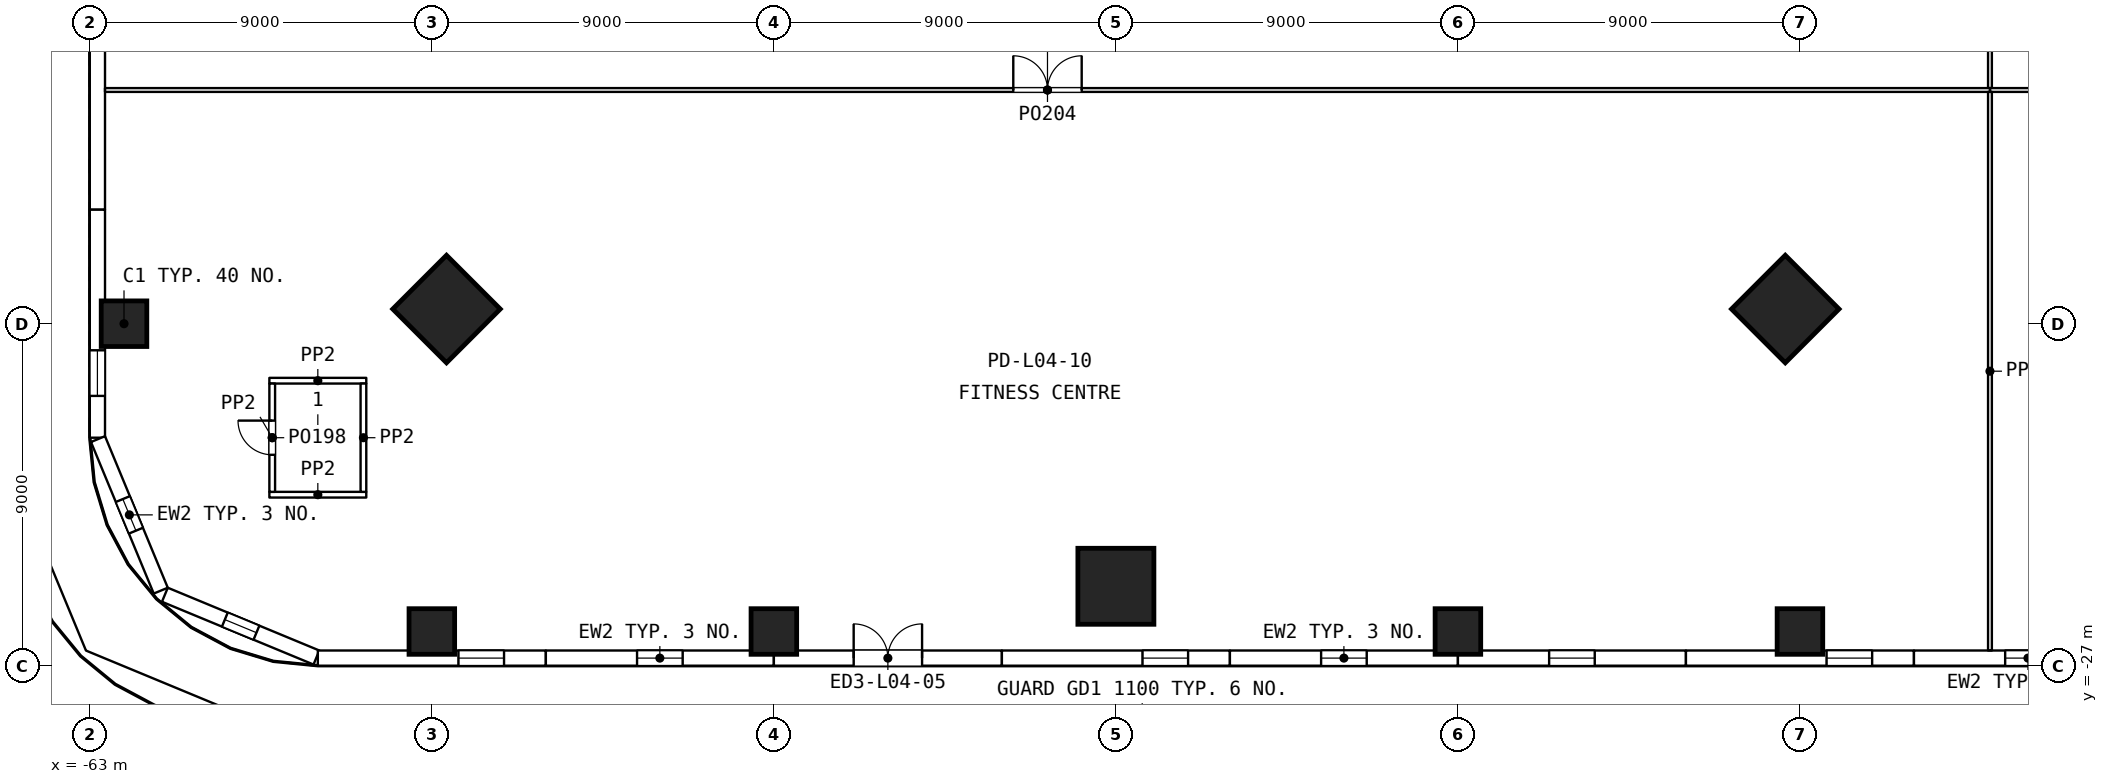
"""IFC4 building model, lengths in metres.
Left out: names, types, materials, properties, quantities, classifications, styles, units other than length and angle.
Written with IfcOpenShell. Run it as: python <this file> out.ifc"""

import sys

from ifc_helpers import new_model, si_unit, direction, frame, frame_2d, origin, origin_2d, place, context, subcontext, project, spatial, rectangle, extrude, element, fill, save


model = new_model("IFC4")
c1 = context("Model", 3, precision=1e-05, world=origin(), true_north=direction((0.0, 1.0)))
c2 = subcontext(c1, "Body", "Model", "MODEL_VIEW")
j1 = project(units=[si_unit("LENGTHUNIT", "METRE"), si_unit("PLANEANGLEUNIT", "RADIAN")], contexts=[c1])
p1 = place(None, origin())
s1 = spatial("IfcSite", under=j1, at=p1, CompositionType="ELEMENT")
p2 = place(p1, origin())
s2 = spatial("IfcBuilding", under=s1, at=p2, CompositionType="ELEMENT")
p3 = place(p2, frame((0.0, 0.0, 22.8)))
s3 = spatial("IfcBuildingStorey", under=s2, at=p3, CompositionType="ELEMENT", Elevation=22.8)
for number, where, z_axis, x_axis in (
    (1, (-62.1, -18.0, 0.0), (0.0, 0.0, 1.0), (1.0, 0.0, 0.0)),
    (2, (-54.0, -26.1, 0.0), (0.0, 0.0, 1.0), (1.0, 0.0, 0.0)),
    (3, (-45.0, -26.1, 0.0), (0.0, 0.0, 1.0), (1.0, 0.0, 0.0)),
    (4, (-27.0, -26.1, 0.0), (0.0, 0.0, 1.0), (1.0, 0.0, 0.0)),
    (5, (-18.0, -26.1, 0.0), (0.0, 0.0, 1.0), (1.0, 0.0, 0.0)),
):
    element("IfcColumn", number, at=place(p3, frame(where, z_axis=z_axis, x_axis=x_axis)), inside=s3, PredefinedType="COLUMN", context=c2, shape_type="SweptSolid", body=[
        extrude(rectangle(XDim=1.2, YDim=1.2, at=origin_2d()), origin(), (0.0, 0.0, 1.0), 4.8),
    ])
for number, where, z_axis, x_axis in (
    (6, (-53.614, -17.614, 0.0), (0.0, 0.0, 1.0), (-0.707, -0.707, 0.0)),
    (7, (-36.0, -24.91, 0.0), (0.0, 0.0, 1.0), (0.0, -1.0, 0.0)),
    (8, (-18.386, -17.614, 0.0), (0.0, 0.0, 1.0), (0.707, -0.707, 0.0)),
):
    element("IfcColumn", number, at=place(p3, frame(where, z_axis=z_axis, x_axis=x_axis)), inside=s3, PredefinedType="COLUMN", context=c2, shape_type="SweptSolid", body=[
        extrude(rectangle(XDim=2.0, YDim=2.0, at=origin_2d()), origin(), (0.0, 0.0, 1.0), 4.8),
    ])
p4 = place(p3, frame((-62.8, -9.0, 0.0), z_axis=(0.0, 0.0, 1.0), x_axis=(0.0, -1.0, 0.0)))
e9 = element("IfcWall", 9, at=p4, inside=s3, PredefinedType="SOLIDWALL", context=c2, shape_type="SweptSolid", body=[
    extrude(rectangle(XDim=6.0, YDim=0.4, at=frame_2d((3.0, 0.0))), origin(), (0.0, 0.0, 1.0), 4.5),
])
p5 = place(p3, frame((-62.8, -15.0, 0.0), z_axis=(0.0, 0.0, 1.0), x_axis=(0.0, -1.0, 0.0)))
e10 = element("IfcWall", 10, at=p5, inside=s3, PredefinedType="SOLIDWALL", context=c2, shape_type="SweptSolid", body=[
    extrude(rectangle(XDim=6.0, YDim=0.4, at=frame_2d((3.0, 0.0))), origin(), (0.0, 0.0, 1.0), 4.5),
])
p6 = place(p5, frame((3.7, 0.0, 1.1)))
e11 = element("IfcOpeningElement", 11, at=p6, cuts=e10, PredefinedType="OPENING", context=c2, shape_type="SweptSolid", body=[
    extrude(rectangle(XDim=1.2, YDim=1.8, at=frame_2d((0.6, 0.9))), frame((0.0, 0.21, 0.0), z_axis=(0.0, -1.0, 0.0), x_axis=(1.0, 0.0, 0.0)), (0.0, 0.0, 1.0), 0.42),
])
p7 = place(p3, frame((-62.785, -21.037, 0.0), z_axis=(0.0, 0.0, 1.0), x_axis=(0.382743086333, -0.923854820772, 0.0)))
e12 = element("IfcWall", 12, at=p7, inside=s3, PredefinedType="SOLIDWALL", context=c2, shape_type="SweptSolid", body=[
    extrude(rectangle(XDim=4.316, YDim=0.4, at=frame_2d((2.158, 0.0))), origin(), (0.0, 0.0, 1.0), 4.5),
])
p8 = place(p7, frame((1.708, 0.0, 1.0)))
e13 = element("IfcOpeningElement", 13, at=p8, cuts=e12, PredefinedType="OPENING", context=c2, shape_type="SweptSolid", body=[
    extrude(rectangle(XDim=0.9, YDim=2.4, at=frame_2d((0.45, 1.2))), frame((0.0, 0.21, 0.0), z_axis=(0.0, -1.0, 0.0), x_axis=(1.0, 0.0, 0.0)), (0.0, 0.0, 1.0), 0.42),
])
p9 = place(p3, frame((-61.025, -25.133, 0.0), z_axis=(0.0, 0.0, 1.0), x_axis=(0.923854820772, -0.382743086333, 0.0)))
e14 = element("IfcWall", 14, at=p9, inside=s3, PredefinedType="SOLIDWALL", context=c2, shape_type="SweptSolid", body=[
    extrude(rectangle(XDim=4.316, YDim=0.4, at=frame_2d((2.158, 0.0))), origin(), (0.0, 0.0, 1.0), 4.5),
])
p10 = place(p9, frame((1.708, 0.0, 1.0)))
e15 = element("IfcOpeningElement", 15, at=p10, cuts=e14, PredefinedType="OPENING", context=c2, shape_type="SweptSolid", body=[
    extrude(rectangle(XDim=0.9, YDim=2.4, at=frame_2d((0.45, 1.2))), frame((0.0, 0.21, 0.0), z_axis=(0.0, -1.0, 0.0), x_axis=(1.0, 0.0, 0.0)), (0.0, 0.0, 1.0), 0.42),
])
p11 = place(p3, frame((-57.0, -26.8, 0.0), z_axis=(0.0, 0.0, 1.0), x_axis=(1.0, 0.0, 0.0)))
e16 = element("IfcWall", 16, at=p11, inside=s3, PredefinedType="SOLIDWALL", context=c2, shape_type="SweptSolid", body=[
    extrude(rectangle(XDim=6.0, YDim=0.4, at=frame_2d((3.0, 0.0))), origin(), (0.0, 0.0, 1.0), 4.5),
])
p12 = place(p11, frame((3.7, 0.0, 1.1)))
e17 = element("IfcOpeningElement", 17, at=p12, cuts=e16, PredefinedType="OPENING", context=c2, shape_type="SweptSolid", body=[
    extrude(rectangle(XDim=1.2, YDim=1.8, at=frame_2d((0.6, 0.9))), frame((0.0, 0.21, 0.0), z_axis=(0.0, -1.0, 0.0), x_axis=(1.0, 0.0, 0.0)), (0.0, 0.0, 1.0), 0.42),
])
p13 = place(p3, frame((-51.0, -26.8, 0.0), z_axis=(0.0, 0.0, 1.0), x_axis=(1.0, 0.0, 0.0)))
e18 = element("IfcWall", 18, at=p13, inside=s3, PredefinedType="SOLIDWALL", context=c2, shape_type="SweptSolid", body=[
    extrude(rectangle(XDim=6.0, YDim=0.4, at=frame_2d((3.0, 0.0))), origin(), (0.0, 0.0, 1.0), 4.5),
])
p14 = place(p13, frame((2.4, 0.0, 1.1)))
e19 = element("IfcOpeningElement", 19, at=p14, cuts=e18, PredefinedType="OPENING", context=c2, shape_type="SweptSolid", body=[
    extrude(rectangle(XDim=1.2, YDim=1.8, at=frame_2d((0.6, 0.9))), frame((0.0, 0.21, 0.0), z_axis=(0.0, -1.0, 0.0), x_axis=(1.0, 0.0, 0.0)), (0.0, 0.0, 1.0), 0.42),
])
p15 = place(p3, frame((-45.0, -26.8, 0.0), z_axis=(0.0, 0.0, 1.0), x_axis=(1.0, 0.0, 0.0)))
e20 = element("IfcWall", 20, at=p15, inside=s3, PredefinedType="SOLIDWALL", context=c2, shape_type="SweptSolid", body=[
    extrude(rectangle(XDim=6.0, YDim=0.4, at=frame_2d((3.0, 0.0))), origin(), (0.0, 0.0, 1.0), 4.5),
])
p16 = place(p15, frame((2.1, 0.0, 0.0)))
e21 = element("IfcOpeningElement", 21, at=p16, cuts=e20, PredefinedType="OPENING", context=c2, shape_type="SweptSolid", body=[
    extrude(rectangle(XDim=1.8, YDim=2.4, at=frame_2d((0.9, 1.2))), frame((0.0, 0.21, 0.0), z_axis=(0.0, -1.0, 0.0), x_axis=(1.0, 0.0, 0.0)), (0.0, 0.0, 1.0), 0.42),
])
p17 = place(p3, frame((-39.0, -26.8, 0.0), z_axis=(0.0, 0.0, 1.0), x_axis=(1.0, 0.0, 0.0)))
e22 = element("IfcWall", 22, at=p17, inside=s3, PredefinedType="SOLIDWALL", context=c2, shape_type="SweptSolid", body=[
    extrude(rectangle(XDim=6.0, YDim=0.4, at=frame_2d((3.0, 0.0))), origin(), (0.0, 0.0, 1.0), 4.5),
])
p18 = place(p17, frame((3.7, 0.0, 1.1)))
e23 = element("IfcOpeningElement", 23, at=p18, cuts=e22, PredefinedType="OPENING", context=c2, shape_type="SweptSolid", body=[
    extrude(rectangle(XDim=1.2, YDim=1.8, at=frame_2d((0.6, 0.9))), frame((0.0, 0.21, 0.0), z_axis=(0.0, -1.0, 0.0), x_axis=(1.0, 0.0, 0.0)), (0.0, 0.0, 1.0), 0.42),
])
p19 = place(p3, frame((-33.0, -26.8, 0.0), z_axis=(0.0, 0.0, 1.0), x_axis=(1.0, 0.0, 0.0)))
e24 = element("IfcWall", 24, at=p19, inside=s3, PredefinedType="SOLIDWALL", context=c2, shape_type="SweptSolid", body=[
    extrude(rectangle(XDim=6.0, YDim=0.4, at=frame_2d((3.0, 0.0))), origin(), (0.0, 0.0, 1.0), 4.5),
])
p20 = place(p19, frame((2.4, 0.0, 1.1)))
e25 = element("IfcOpeningElement", 25, at=p20, cuts=e24, PredefinedType="OPENING", context=c2, shape_type="SweptSolid", body=[
    extrude(rectangle(XDim=1.2, YDim=1.8, at=frame_2d((0.6, 0.9))), frame((0.0, 0.21, 0.0), z_axis=(0.0, -1.0, 0.0), x_axis=(1.0, 0.0, 0.0)), (0.0, 0.0, 1.0), 0.42),
])
p21 = place(p3, frame((-27.0, -26.8, 0.0), z_axis=(0.0, 0.0, 1.0), x_axis=(1.0, 0.0, 0.0)))
e26 = element("IfcWall", 26, at=p21, inside=s3, PredefinedType="SOLIDWALL", context=c2, shape_type="SweptSolid", body=[
    extrude(rectangle(XDim=6.0, YDim=0.4, at=frame_2d((3.0, 0.0))), origin(), (0.0, 0.0, 1.0), 4.5),
])
p22 = place(p21, frame((2.4, 0.0, 1.1)))
e27 = element("IfcOpeningElement", 27, at=p22, cuts=e26, PredefinedType="OPENING", context=c2, shape_type="SweptSolid", body=[
    extrude(rectangle(XDim=1.2, YDim=1.8, at=frame_2d((0.6, 0.9))), frame((0.0, 0.21, 0.0), z_axis=(0.0, -1.0, 0.0), x_axis=(1.0, 0.0, 0.0)), (0.0, 0.0, 1.0), 0.42),
])
p23 = place(p3, frame((-21.0, -26.8, 0.0), z_axis=(0.0, 0.0, 1.0), x_axis=(1.0, 0.0, 0.0)))
e28 = element("IfcWall", 28, at=p23, inside=s3, PredefinedType="SOLIDWALL", context=c2, shape_type="SweptSolid", body=[
    extrude(rectangle(XDim=6.0, YDim=0.4, at=frame_2d((3.0, 0.0))), origin(), (0.0, 0.0, 1.0), 4.5),
])
p24 = place(p23, frame((3.7, 0.0, 1.1)))
e29 = element("IfcOpeningElement", 29, at=p24, cuts=e28, PredefinedType="OPENING", context=c2, shape_type="SweptSolid", body=[
    extrude(rectangle(XDim=1.2, YDim=1.8, at=frame_2d((0.6, 0.9))), frame((0.0, 0.21, 0.0), z_axis=(0.0, -1.0, 0.0), x_axis=(1.0, 0.0, 0.0)), (0.0, 0.0, 1.0), 0.42),
])
p25 = place(p3, frame((-15.0, -26.8, 0.0), z_axis=(0.0, 0.0, 1.0), x_axis=(1.0, 0.0, 0.0)))
e30 = element("IfcWall", 30, at=p25, inside=s3, PredefinedType="SOLIDWALL", context=c2, shape_type="SweptSolid", body=[
    extrude(rectangle(XDim=6.0, YDim=0.4, at=frame_2d((3.0, 0.0))), origin(), (0.0, 0.0, 1.0), 4.5),
])
p26 = place(p25, frame((2.4, 0.0, 1.1)))
e31 = element("IfcOpeningElement", 31, at=p26, cuts=e30, PredefinedType="OPENING", context=c2, shape_type="SweptSolid", body=[
    extrude(rectangle(XDim=1.2, YDim=1.8, at=frame_2d((0.6, 0.9))), frame((0.0, 0.21, 0.0), z_axis=(0.0, -1.0, 0.0), x_axis=(1.0, 0.0, 0.0)), (0.0, 0.0, 1.0), 0.42),
])
for number, where, z_axis, x_axis in (
    (32, (-58.275, -22.5, 0.0), (0.0, 0.0, 1.0), (1.0, 0.0, 0.0)),
    (33, (-58.275, -19.5, 0.0), (0.0, 0.0, 1.0), (1.0, 0.0, 0.0)),
):
    element("IfcWall", number, at=place(p3, frame(where, z_axis=z_axis, x_axis=x_axis)), inside=s3, PredefinedType="PARTITIONING", context=c2, shape_type="SweptSolid", body=[
        extrude(rectangle(XDim=2.55, YDim=0.15, at=frame_2d((1.275, 0.0))), origin(), (0.0, 0.0, 1.0), 4.5),
    ])
p27 = place(p3, frame((-58.2, -22.425, 0.0), z_axis=(0.0, 0.0, 1.0), x_axis=(0.0, 1.0, 0.0)))
e34 = element("IfcWall", 34, at=p27, inside=s3, PredefinedType="PARTITIONING", context=c2, shape_type="SweptSolid", body=[
    extrude(rectangle(XDim=2.85, YDim=0.15, at=frame_2d((1.425, 0.0))), origin(), (0.0, 0.0, 1.0), 4.5),
])
p28 = place(p27, frame((0.975, 0.0, 0.0)))
e35 = element("IfcOpeningElement", 35, at=p28, cuts=e34, PredefinedType="OPENING", context=c2, shape_type="SweptSolid", body=[
    extrude(rectangle(XDim=0.9, YDim=2.1, at=frame_2d((0.45, 1.05))), frame((0.0, 0.085, 0.0), z_axis=(0.0, -1.0, 0.0), x_axis=(1.0, 0.0, 0.0)), (0.0, 0.0, 1.0), 0.17),
])
p29 = place(p3, frame((-55.8, -22.425, 0.0), z_axis=(0.0, 0.0, 1.0), x_axis=(0.0, 1.0, 0.0)))
e36 = element("IfcWall", 36, at=p29, inside=s3, PredefinedType="PARTITIONING", context=c2, shape_type="SweptSolid", body=[
    extrude(rectangle(XDim=2.85, YDim=0.15, at=frame_2d((1.425, 0.0))), origin(), (0.0, 0.0, 1.0), 4.5),
])
p30 = place(p3, frame((-13.0, -11.8, 0.0), z_axis=(0.0, 0.0, 1.0), x_axis=(0.0, 1.0, 0.0)))
e37 = element("IfcWall", 37, at=p30, inside=s3, PredefinedType="PARTITIONING", context=c2, shape_type="SweptSolid", body=[
    extrude(rectangle(XDim=23.6, YDim=0.1, at=frame_2d((11.8, 0.0))), origin(), (0.0, 0.0, 1.0), 4.5),
])
p31 = place(p30, frame((13.55, 0.0, 0.0)))
e38 = element("IfcOpeningElement", 38, at=p31, cuts=e37, PredefinedType="OPENING", context=c2, shape_type="SweptSolid", body=[
    extrude(rectangle(XDim=1.8, YDim=2.1, at=frame_2d((0.9, 1.05))), frame((0.0, 0.06, 0.0), z_axis=(0.0, -1.0, 0.0), x_axis=(1.0, 0.0, 0.0)), (0.0, 0.0, 1.0), 0.12),
])
p32 = place(p3, frame((-13.0, -11.85, 0.0), z_axis=(0.0, 0.0, 1.0), x_axis=(1.0, 0.0, 0.0)))
e39 = element("IfcWall", 39, at=p32, inside=s3, PredefinedType="PARTITIONING", context=c2, shape_type="SweptSolid", body=[
    extrude(rectangle(XDim=26.0, YDim=0.1, at=frame_2d((13.0, 0.0))), origin(), (0.0, 0.0, 1.0), 4.5),
])
p33 = place(p32, frame((12.1, 0.0, 0.0)))
e40 = element("IfcOpeningElement", 40, at=p33, cuts=e39, PredefinedType="OPENING", context=c2, shape_type="SweptSolid", body=[
    extrude(rectangle(XDim=1.8, YDim=2.1, at=frame_2d((0.9, 1.05))), frame((0.0, 0.06, 0.0), z_axis=(0.0, -1.0, 0.0), x_axis=(1.0, 0.0, 0.0)), (0.0, 0.0, 1.0), 0.12),
])
p34 = place(p3, frame((-62.6, -11.85, 0.0), z_axis=(0.0, 0.0, 1.0), x_axis=(1.0, 0.0, 0.0)))
e41 = element("IfcWall", 41, at=p34, inside=s3, PredefinedType="PARTITIONING", context=c2, shape_type="SweptSolid", body=[
    extrude(rectangle(XDim=49.6, YDim=0.1, at=frame_2d((24.8, 0.0))), origin(), (0.0, 0.0, 1.0), 4.5),
])
p35 = place(p34, frame((23.9, 0.0, 0.0)))
e42 = element("IfcOpeningElement", 42, at=p35, cuts=e41, PredefinedType="OPENING", context=c2, shape_type="SweptSolid", body=[
    extrude(rectangle(XDim=1.8, YDim=2.1, at=frame_2d((0.9, 1.05))), frame((0.0, 0.06, 0.0), z_axis=(0.0, -1.0, 0.0), x_axis=(1.0, 0.0, 0.0)), (0.0, 0.0, 1.0), 0.12),
])
p36 = place(p3, frame((-13.0, -26.6, 0.0), z_axis=(0.0, 0.0, 1.0), x_axis=(0.0, 1.0, 0.0)))
e43 = element("IfcWall", 43, at=p36, inside=s3, PredefinedType="PARTITIONING", context=c2, shape_type="SweptSolid", body=[
    extrude(rectangle(XDim=14.7, YDim=0.1, at=frame_2d((7.35, 0.0))), origin(), (0.0, 0.0, 1.0), 4.5),
])
p37 = place(p6, origin())
e44 = element("IfcWindow", 44, at=p37, inside=s3, PartitioningType="SINGLE_PANEL", PredefinedType="WINDOW", context=c2, shape_type="SweptSolid", body=[
    extrude(rectangle(XDim=1.2, YDim=1.8, at=frame_2d((0.6, 0.9))), frame((0.0, 0.03, 0.0), z_axis=(0.0, -1.0, 0.0), x_axis=(1.0, 0.0, 0.0)), (0.0, 0.0, 1.0), 0.06),
])
fill(e11, e44)
p38 = place(p8, origin())
e45 = element("IfcWindow", 45, at=p38, inside=s3, PartitioningType="SINGLE_PANEL", PredefinedType="WINDOW", context=c2, shape_type="SweptSolid", body=[
    extrude(rectangle(XDim=0.9, YDim=2.4, at=frame_2d((0.45, 1.2))), frame((0.0, 0.03, 0.0), z_axis=(0.0, -1.0, 0.0), x_axis=(1.0, 0.0, 0.0)), (0.0, 0.0, 1.0), 0.06),
])
fill(e13, e45)
p39 = place(p10, origin())
e46 = element("IfcWindow", 46, at=p39, inside=s3, PartitioningType="SINGLE_PANEL", PredefinedType="WINDOW", context=c2, shape_type="SweptSolid", body=[
    extrude(rectangle(XDim=0.9, YDim=2.4, at=frame_2d((0.45, 1.2))), frame((0.0, 0.03, 0.0), z_axis=(0.0, -1.0, 0.0), x_axis=(1.0, 0.0, 0.0)), (0.0, 0.0, 1.0), 0.06),
])
fill(e15, e46)
p40 = place(p12, origin())
e47 = element("IfcWindow", 47, at=p40, inside=s3, PartitioningType="SINGLE_PANEL", PredefinedType="WINDOW", context=c2, shape_type="SweptSolid", body=[
    extrude(rectangle(XDim=1.2, YDim=1.8, at=frame_2d((0.6, 0.9))), frame((0.0, 0.03, 0.0), z_axis=(0.0, -1.0, 0.0), x_axis=(1.0, 0.0, 0.0)), (0.0, 0.0, 1.0), 0.06),
])
fill(e17, e47)
p41 = place(p14, origin())
e48 = element("IfcWindow", 48, at=p41, inside=s3, PartitioningType="SINGLE_PANEL", PredefinedType="WINDOW", context=c2, shape_type="SweptSolid", body=[
    extrude(rectangle(XDim=1.2, YDim=1.8, at=frame_2d((0.6, 0.9))), frame((0.0, 0.03, 0.0), z_axis=(0.0, -1.0, 0.0), x_axis=(1.0, 0.0, 0.0)), (0.0, 0.0, 1.0), 0.06),
])
fill(e19, e48)
p42 = place(p16, origin())
e49 = element("IfcDoor", 49, at=p42, inside=s3, OperationType="SINGLE_SWING_LEFT", PredefinedType="DOOR", context=c2, shape_type="SweptSolid", body=[
    extrude(rectangle(XDim=1.8, YDim=2.4, at=frame_2d((0.9, 1.2))), frame((0.0, 0.025, 0.0), z_axis=(0.0, -1.0, 0.0), x_axis=(1.0, 0.0, 0.0)), (0.0, 0.0, 1.0), 0.05),
])
fill(e21, e49)
p43 = place(p18, origin())
e50 = element("IfcWindow", 50, at=p43, inside=s3, PartitioningType="SINGLE_PANEL", PredefinedType="WINDOW", context=c2, shape_type="SweptSolid", body=[
    extrude(rectangle(XDim=1.2, YDim=1.8, at=frame_2d((0.6, 0.9))), frame((0.0, 0.03, 0.0), z_axis=(0.0, -1.0, 0.0), x_axis=(1.0, 0.0, 0.0)), (0.0, 0.0, 1.0), 0.06),
])
fill(e23, e50)
p44 = place(p20, origin())
e51 = element("IfcWindow", 51, at=p44, inside=s3, PartitioningType="SINGLE_PANEL", PredefinedType="WINDOW", context=c2, shape_type="SweptSolid", body=[
    extrude(rectangle(XDim=1.2, YDim=1.8, at=frame_2d((0.6, 0.9))), frame((0.0, 0.03, 0.0), z_axis=(0.0, -1.0, 0.0), x_axis=(1.0, 0.0, 0.0)), (0.0, 0.0, 1.0), 0.06),
])
fill(e25, e51)
p45 = place(p22, origin())
e52 = element("IfcWindow", 52, at=p45, inside=s3, PartitioningType="SINGLE_PANEL", PredefinedType="WINDOW", context=c2, shape_type="SweptSolid", body=[
    extrude(rectangle(XDim=1.2, YDim=1.8, at=frame_2d((0.6, 0.9))), frame((0.0, 0.03, 0.0), z_axis=(0.0, -1.0, 0.0), x_axis=(1.0, 0.0, 0.0)), (0.0, 0.0, 1.0), 0.06),
])
fill(e27, e52)
p46 = place(p24, origin())
e53 = element("IfcWindow", 53, at=p46, inside=s3, PartitioningType="SINGLE_PANEL", PredefinedType="WINDOW", context=c2, shape_type="SweptSolid", body=[
    extrude(rectangle(XDim=1.2, YDim=1.8, at=frame_2d((0.6, 0.9))), frame((0.0, 0.03, 0.0), z_axis=(0.0, -1.0, 0.0), x_axis=(1.0, 0.0, 0.0)), (0.0, 0.0, 1.0), 0.06),
])
fill(e29, e53)
p47 = place(p26, origin())
e54 = element("IfcWindow", 54, at=p47, inside=s3, PartitioningType="SINGLE_PANEL", PredefinedType="WINDOW", context=c2, shape_type="SweptSolid", body=[
    extrude(rectangle(XDim=1.2, YDim=1.8, at=frame_2d((0.6, 0.9))), frame((0.0, 0.03, 0.0), z_axis=(0.0, -1.0, 0.0), x_axis=(1.0, 0.0, 0.0)), (0.0, 0.0, 1.0), 0.06),
])
fill(e31, e54)
p48 = place(p28, origin())
e55 = element("IfcDoor", 55, at=p48, inside=s3, OperationType="SINGLE_SWING_RIGHT", PredefinedType="DOOR", context=c2, shape_type="SweptSolid", body=[
    extrude(rectangle(XDim=0.9, YDim=2.1, at=frame_2d((0.45, 1.05))), frame((0.0, 0.025, 0.0), z_axis=(0.0, -1.0, 0.0), x_axis=(1.0, 0.0, 0.0)), (0.0, 0.0, 1.0), 0.05),
])
fill(e35, e55)
p49 = place(p35, origin())
e56 = element("IfcDoor", 56, at=p49, inside=s3, OperationType="DOUBLE_DOOR_DOUBLE_SWING", PredefinedType="DOOR", context=c2, shape_type="SweptSolid", body=[
    extrude(rectangle(XDim=1.8, YDim=2.1, at=frame_2d((0.9, 1.05))), frame((0.0, 0.025, 0.0), z_axis=(0.0, -1.0, 0.0), x_axis=(1.0, 0.0, 0.0)), (0.0, 0.0, 1.0), 0.05),
])
fill(e42, e56)
save(model, sys.argv[1])
